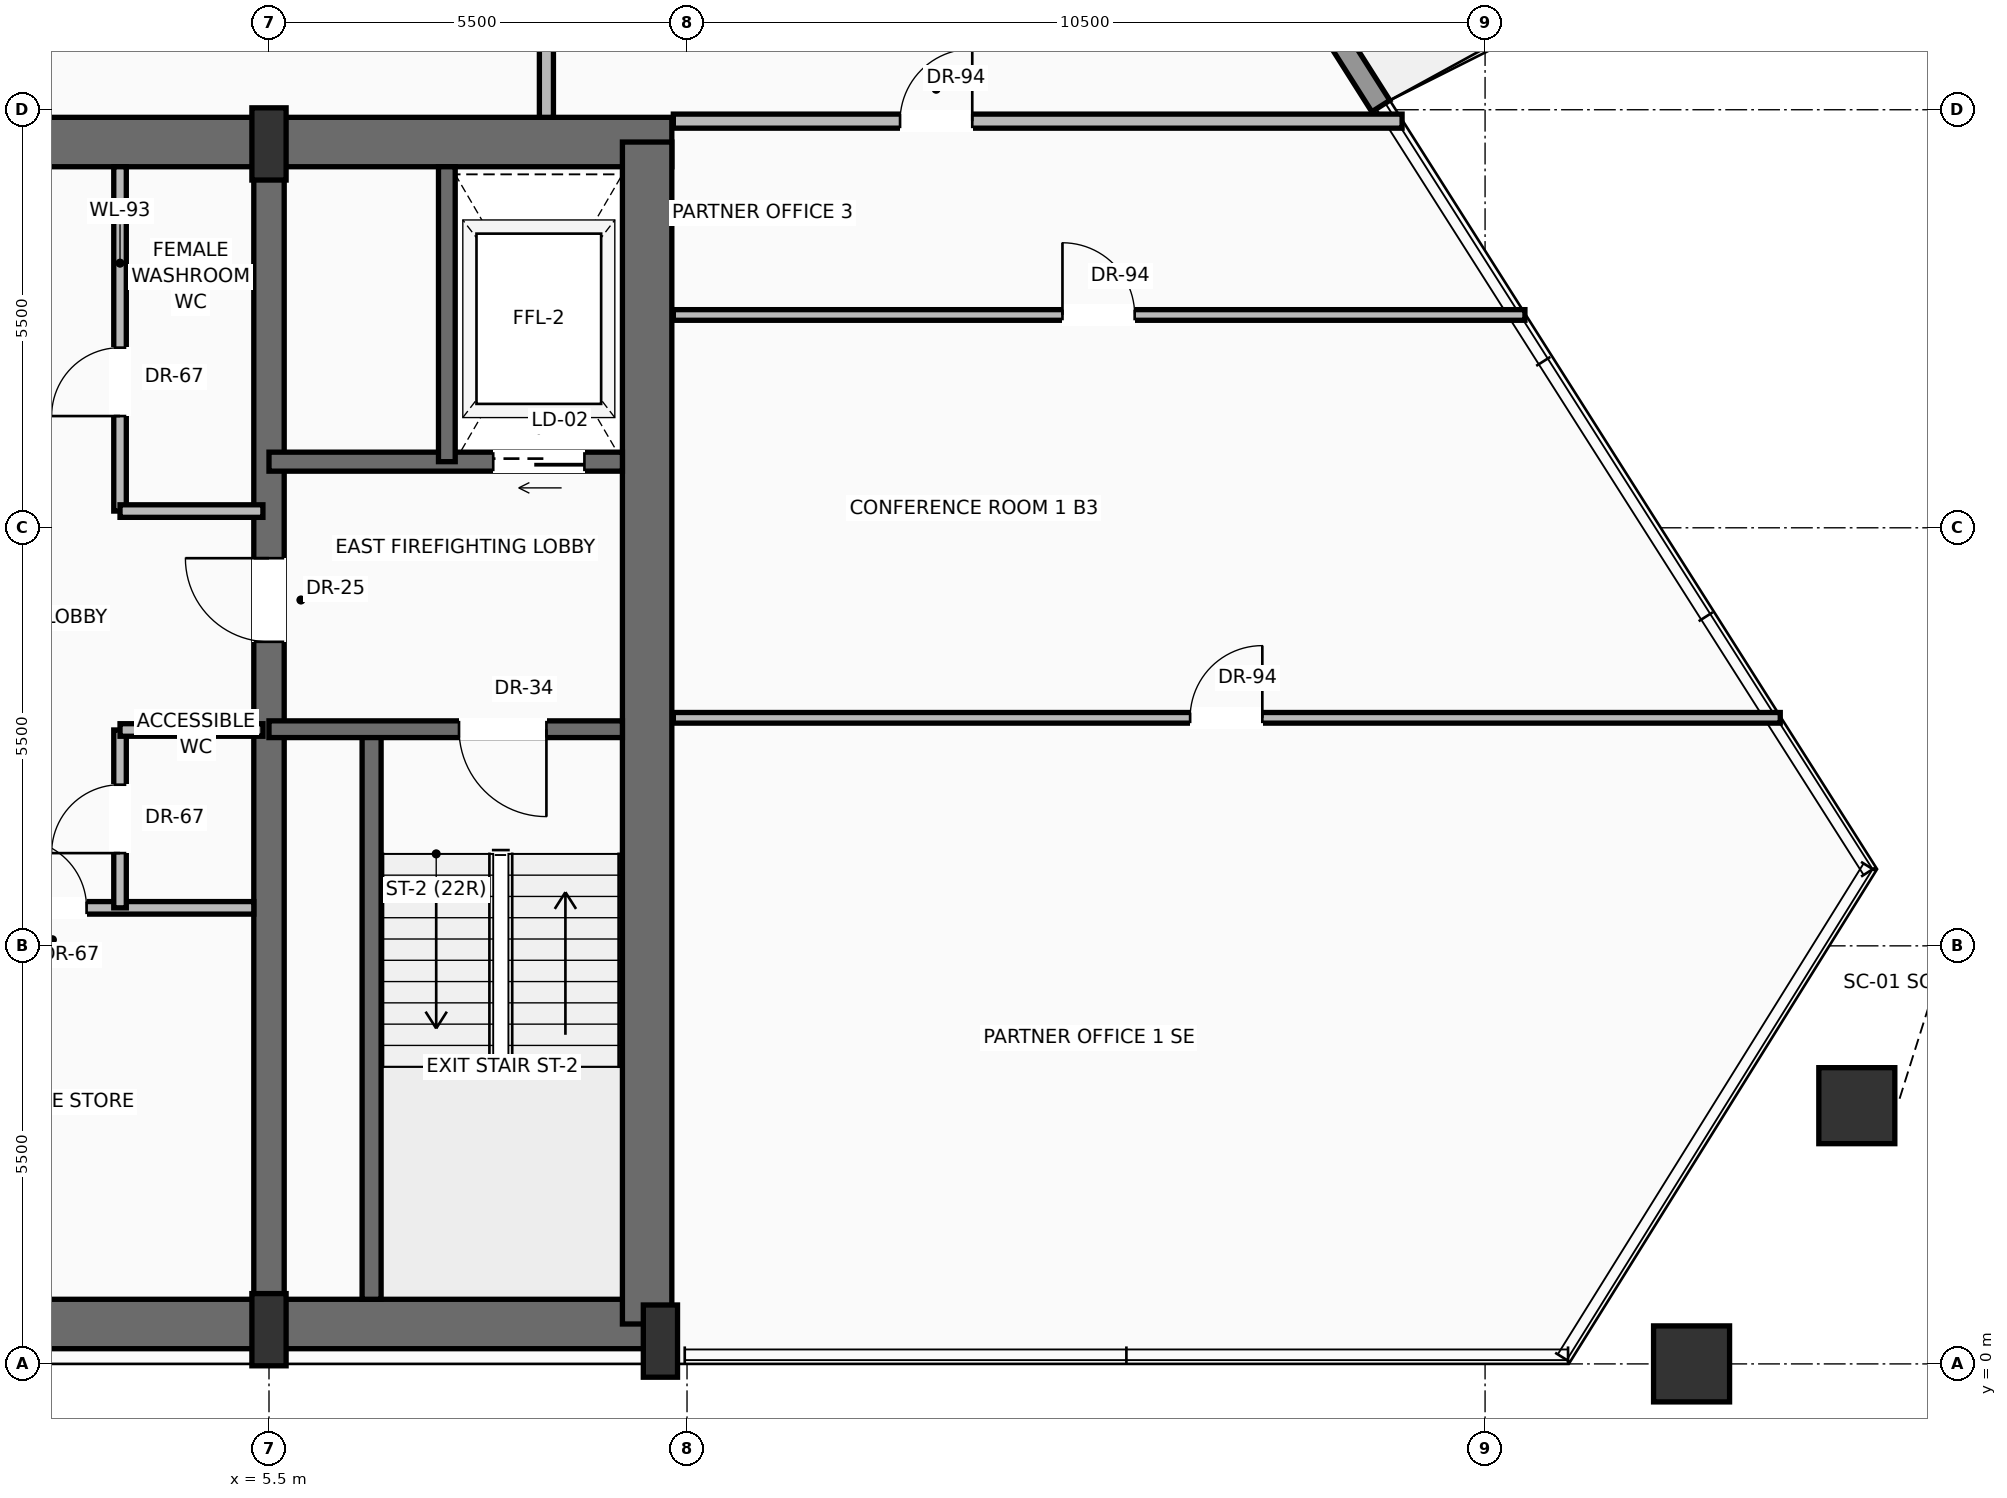
"""IFC4 building model, lengths in metres.
Left out: names, types, materials, properties, quantities, classifications, styles, units other than length and angle.
Written with IfcOpenShell. Run it as: python <this file> out.ifc"""

import sys

from ifc_helpers import new_model, si_unit, direction, frame, frame_2d, origin, origin_2d, place, context, subcontext, project, spatial, rectangle, hollow_rectangle, extrude, source, transform, mapped, element, fill, save


model = new_model("IFC4")
c1 = context("Model", 3, precision=1e-05, world=origin(), true_north=direction((0.0, 1.0)))
c2 = subcontext(c1, "Body", "Model", "MODEL_VIEW")
j1 = project(units=[si_unit("LENGTHUNIT", "METRE"), si_unit("PLANEANGLEUNIT", "RADIAN")], contexts=[c1])
p1 = place(None, origin())
s1 = spatial("IfcSite", under=j1, at=p1, CompositionType="ELEMENT")
p2 = place(p1, origin())
s2 = spatial("IfcBuilding", under=s1, at=p2, CompositionType="ELEMENT")
p3 = place(p2, frame((0.0, 0.0, 182.1)))
s3 = spatial("IfcBuildingStorey", under=s2, at=p3, CompositionType="ELEMENT", Elevation=182.1)
p4 = place(p3, frame((-10.65, 0.525, 0.0), z_axis=(0.0, 0.0, 1.0), x_axis=(1.0, 0.0, 0.0)))
e1 = element("IfcWall", 1, at=p4, inside=s3, PredefinedType="SHEAR", context=c2, shape_type="SweptSolid", body=[
    extrude(rectangle(XDim=21.3, YDim=0.65, at=frame_2d((10.65, 0.0))), origin(), (0.0, 0.0, 1.0), 3.47),
])
p5 = place(p3, frame((-10.8, 16.075, 0.0), z_axis=(0.0, 0.0, 1.0), x_axis=(1.0, 0.0, 0.0)))
e2 = element("IfcWall", 2, at=p5, inside=s3, PredefinedType="SHEAR", context=c2, shape_type="SweptSolid", body=[
    extrude(rectangle(XDim=21.6, YDim=0.65, at=frame_2d((10.8, 0.0))), origin(), (0.0, 0.0, 1.0), 3.47),
])
p6 = place(p5, frame((3.37, 0.0, 0.0)))
e3 = element("IfcOpeningElement", 3, at=p6, cuts=e2, PredefinedType="OPENING", context=c2, shape_type="SweptSolid", body=[
    extrude(rectangle(XDim=1.3, YDim=2.3, at=frame_2d((0.65, 1.15))), frame((0.0, 0.335, 0.0), z_axis=(0.0, -1.0, 0.0), x_axis=(1.0, 0.0, 0.0)), (0.0, 0.0, 1.0), 0.67),
])
p7 = place(p5, frame((9.8, 0.0, 0.0)))
e4 = element("IfcOpeningElement", 4, at=p7, cuts=e2, PredefinedType="OPENING", context=c2, shape_type="SweptSolid", body=[
    extrude(rectangle(XDim=2.0, YDim=2.4, at=frame_2d((1.0, 1.2))), frame((0.0, 0.335, 0.0), z_axis=(0.0, -1.0, 0.0), x_axis=(1.0, 0.0, 0.0)), (0.0, 0.0, 1.0), 0.67),
])
p8 = place(p3, frame((10.475, 0.525, 0.0), z_axis=(0.0, 0.0, 1.0), x_axis=(0.0, 1.0, 0.0)))
e5 = element("IfcWall", 5, at=p8, inside=s3, PredefinedType="SHEAR", context=c2, shape_type="SweptSolid", body=[
    extrude(rectangle(XDim=15.55, YDim=0.65, at=frame_2d((7.775, 0.0))), origin(), (0.0, 0.0, 1.0), 3.47),
])
p9 = place(p3, frame((5.5, 0.525, 0.0), z_axis=(0.0, 0.0, 1.0), x_axis=(0.0, 1.0, 0.0)))
e6 = element("IfcWall", 6, at=p9, inside=s3, PredefinedType="SHEAR", context=c2, shape_type="SweptSolid", body=[
    extrude(rectangle(XDim=15.55, YDim=0.4, at=frame_2d((7.775, 0.0))), origin(), (0.0, 0.0, 1.0), 3.47),
])
p10 = place(p9, frame((8.975, 0.0, 0.0)))
e7 = element("IfcOpeningElement", 7, at=p10, cuts=e6, PredefinedType="OPENING", context=c2, shape_type="SweptSolid", body=[
    extrude(rectangle(XDim=1.1, YDim=2.2, at=frame_2d((0.55, 1.1))), frame((0.0, 0.21, 0.0), z_axis=(0.0, -1.0, 0.0), x_axis=(1.0, 0.0, 0.0)), (0.0, 0.0, 1.0), 0.42),
])
m1 = source(origin(), c2, "Body", "SweptSolid", [
    extrude(rectangle(XDim=0.45, YDim=0.95, at=origin_2d()), origin(), (0.0, 0.0, 1.0), 3.7),
])
for number, where, z_axis, x_axis in (
    (8, (5.5, 0.45, 0.0), (0.0, 0.0, 1.0), (1.0, 0.0, 0.0)),
    (9, (10.65, 0.3, 0.0), (0.0, 0.0, 1.0), (1.0, 0.0, 0.0)),
    (10, (5.5, 16.05, 0.0), (0.0, 0.0, 1.0), (1.0, 0.0, 0.0)),
):
    element("IfcColumn", number, at=place(p3, frame(where, z_axis=z_axis, x_axis=x_axis)), inside=s3, PredefinedType="PILASTER", context=c2, shape_type="MappedRepresentation", body=[
        mapped(m1, transform((0.0, 0.0, 0.0), scale=1.0)),
    ])
m2 = source(origin(), c2, "Body", "SweptSolid", [
    extrude(hollow_rectangle(XDim=1.0, YDim=1.0, WallThickness=0.05, at=origin_2d()), origin(), (0.0, 0.0, 1.0), 3.691),
])
p11 = place(p3, frame((24.217, 0.0, 0.004), z_axis=(0.005688114871, 0.0, 0.999983822544), x_axis=(0.0, 1.0, 0.0)))
e11 = element("IfcColumn", 11, at=p11, inside=s3, PredefinedType="COLUMN", context=c2, shape_type="MappedRepresentation", body=[
    mapped(m2, transform((0.0, 0.0, 0.0), scale=1.0)),
])
m3 = source(origin(), c2, "Body", "SweptSolid", [
    extrude(hollow_rectangle(XDim=1.0, YDim=1.0, WallThickness=0.05, at=origin_2d()), origin(), (0.0, 0.0, 1.0), 3.692),
])
p12 = place(p3, frame((26.391, 3.397, 0.004), z_axis=(-0.005885896264, -0.014681673826, 0.999874894514), x_axis=(0.928188064334, -0.372111431197, 0.0)))
e12 = element("IfcColumn", 12, at=p12, inside=s3, PredefinedType="COLUMN", context=c2, shape_type="MappedRepresentation", body=[
    mapped(m3, transform((0.0, 0.0, 0.0), scale=1.0)),
])
p13 = place(p3, frame((10.054, 32.443, 0.0), z_axis=(0.0, 0.0, 1.0), x_axis=(0.535358537379, -0.844624908735, 0.0)))
e13 = element("IfcWall", 13, at=p13, inside=s3, PredefinedType="SOLIDWALL", context=c2, shape_type="SweptSolid", body=[
    extrude(rectangle(XDim=18.818, YDim=0.28, at=frame_2d((9.409, 0.0))), origin(), (0.0, 0.0, 1.0), 3.05),
])
p14 = place(p13, frame((4.516, 0.0, 0.0)))
e14 = element("IfcOpeningElement", 14, at=p14, cuts=e13, PredefinedType="OPENING", context=c2, shape_type="SweptSolid", body=[
    extrude(rectangle(XDim=1.6, YDim=2.35, at=frame_2d((0.8, 1.175))), frame((0.0, 0.15, 0.0), z_axis=(0.0, -1.0, 0.0), x_axis=(1.0, 0.0, 0.0)), (0.0, 0.0, 1.0), 0.3),
])
p15 = place(p13, frame((12.796, 0.0, 0.9)))
e15 = element("IfcOpeningElement", 15, at=p15, cuts=e13, PredefinedType="OPENING", context=c2, shape_type="SweptSolid", body=[
    extrude(rectangle(XDim=2.0, YDim=1.85, at=frame_2d((1.0, 0.925))), frame((0.0, 0.15, 0.0), z_axis=(0.0, -1.0, 0.0), x_axis=(1.0, 0.0, 0.0)), (0.0, 0.0, 1.0), 0.3),
])
p16 = place(p3, frame((6.85, 0.85, 0.0), z_axis=(0.0, 0.0, 1.0), x_axis=(0.0, 1.0, 0.0)))
e16 = element("IfcWall", 16, at=p16, inside=s3, PredefinedType="SOLIDWALL", context=c2, shape_type="SweptSolid", body=[
    extrude(rectangle(XDim=7.5, YDim=0.25, at=frame_2d((3.75, 0.0))), origin(), (0.0, 0.0, 1.0), 3.47),
])
p17 = place(p3, frame((10.15, 8.35, 0.0), z_axis=(0.0, 0.0, 1.0), x_axis=(-1.0, 0.0, 0.0)))
e17 = element("IfcWall", 17, at=p17, inside=s3, PredefinedType="SOLIDWALL", context=c2, shape_type="SweptSolid", body=[
    extrude(rectangle(XDim=4.65, YDim=0.22, at=frame_2d((2.325, 0.0))), origin(), (0.0, 0.0, 1.0), 3.47),
])
p18 = place(p17, frame((1.0, 0.0, 0.0)))
e18 = element("IfcOpeningElement", 18, at=p18, cuts=e17, PredefinedType="OPENING", context=c2, shape_type="SweptSolid", body=[
    extrude(rectangle(XDim=1.15, YDim=2.2, at=frame_2d((0.575, 1.1))), frame((0.0, 0.12, 0.0), z_axis=(0.0, -1.0, 0.0), x_axis=(1.0, 0.0, 0.0)), (0.0, 0.0, 1.0), 0.24),
])
p19 = place(p3, frame((10.15, 11.87, 0.0), z_axis=(0.0, 0.0, 1.0), x_axis=(-1.0, 0.0, 0.0)))
e19 = element("IfcWall", 19, at=p19, inside=s3, PredefinedType="SOLIDWALL", context=c2, shape_type="SweptSolid", body=[
    extrude(rectangle(XDim=4.65, YDim=0.25, at=frame_2d((2.325, 0.0))), origin(), (0.0, 0.0, 1.0), 3.47),
])
p20 = place(p19, frame((0.5, 0.0, 0.0)))
e20 = element("IfcOpeningElement", 20, at=p20, cuts=e19, PredefinedType="OPENING", context=c2, shape_type="SweptSolid", body=[
    extrude(rectangle(XDim=1.2, YDim=2.25, at=frame_2d((0.6, 1.125))), frame((0.0, 0.135, 0.0), z_axis=(0.0, -1.0, 0.0), x_axis=(1.0, 0.0, 0.0)), (0.0, 0.0, 1.0), 0.27),
])
p21 = place(p3, frame((7.84, 11.87, 0.0), z_axis=(0.0, 0.0, 1.0), x_axis=(0.0, 1.0, 0.0)))
e21 = element("IfcWall", 21, at=p21, inside=s3, PredefinedType="SOLIDWALL", context=c2, shape_type="SweptSolid", body=[
    extrude(rectangle(XDim=3.88, YDim=0.22, at=frame_2d((1.94, 0.0))), origin(), (0.0, 0.0, 1.0), 3.47),
])
p22 = place(p3, frame((1.82, 6.0, 0.0), z_axis=(0.0, 0.0, 1.0), x_axis=(1.0, 0.0, 0.0)))
e22 = element("IfcWall", 22, at=p22, inside=s3, PredefinedType="PARTITIONING", context=c2, shape_type="SweptSolid", body=[
    extrude(rectangle(XDim=3.48, YDim=0.165, at=frame_2d((1.74, 0.0))), origin(), (0.0, 0.0, 1.0), 3.462),
])
p23 = place(p22, frame((0.38, 0.0, 0.0)))
e23 = element("IfcOpeningElement", 23, at=p23, cuts=e22, PredefinedType="OPENING", context=c2, shape_type="SweptSolid", body=[
    extrude(rectangle(XDim=0.9, YDim=2.1, at=frame_2d((0.45, 1.05))), frame((0.0, 0.093, 0.0), z_axis=(0.0, -1.0, 0.0), x_axis=(1.0, 0.0, 0.0)), (0.0, 0.0, 1.0), 0.185),
])
p24 = place(p3, frame((3.54, 6.0, 0.0), z_axis=(0.0, 0.0, 1.0), x_axis=(0.0, 1.0, 0.0)))
e24 = element("IfcWall", 24, at=p24, inside=s3, PredefinedType="PARTITIONING", context=c2, shape_type="SweptSolid", body=[
    extrude(rectangle(XDim=2.34, YDim=0.165, at=frame_2d((1.17, 0.0))), origin(), (0.0, 0.0, 1.0), 3.462),
])
p25 = place(p24, frame((0.72, 0.0, 0.0)))
e25 = element("IfcOpeningElement", 25, at=p25, cuts=e24, PredefinedType="OPENING", context=c2, shape_type="SweptSolid", body=[
    extrude(rectangle(XDim=0.9, YDim=2.1, at=frame_2d((0.45, 1.05))), frame((0.0, 0.093, 0.0), z_axis=(0.0, -1.0, 0.0), x_axis=(1.0, 0.0, 0.0)), (0.0, 0.0, 1.0), 0.185),
])
p26 = place(p3, frame((3.54, 8.34, 0.0), z_axis=(0.0, 0.0, 1.0), x_axis=(1.0, 0.0, 0.0)))
e26 = element("IfcWall", 26, at=p26, inside=s3, PredefinedType="PARTITIONING", context=c2, shape_type="SweptSolid", body=[
    extrude(rectangle(XDim=1.88, YDim=0.165, at=frame_2d((0.94, 0.0))), origin(), (0.0, 0.0, 1.0), 3.462),
])
p27 = place(p3, frame((3.54, 11.22, 0.0), z_axis=(0.0, 0.0, 1.0), x_axis=(0.0, 1.0, 0.0)))
e27 = element("IfcWall", 27, at=p27, inside=s3, PredefinedType="PARTITIONING", context=c2, shape_type="SweptSolid", body=[
    extrude(rectangle(XDim=4.53, YDim=0.165, at=frame_2d((2.265, 0.0))), origin(), (0.0, 0.0, 1.0), 3.462),
])
p28 = place(p27, frame((1.25, 0.0, 0.0)))
e28 = element("IfcOpeningElement", 28, at=p28, cuts=e27, PredefinedType="OPENING", context=c2, shape_type="SweptSolid", body=[
    extrude(rectangle(XDim=0.9, YDim=2.1, at=frame_2d((0.45, 1.05))), frame((0.0, 0.093, 0.0), z_axis=(0.0, -1.0, 0.0), x_axis=(1.0, 0.0, 0.0)), (0.0, 0.0, 1.0), 0.185),
])
p29 = place(p3, frame((3.54, 11.22, 0.0), z_axis=(0.0, 0.0, 1.0), x_axis=(1.0, 0.0, 0.0)))
e29 = element("IfcWall", 29, at=p29, inside=s3, PredefinedType="PARTITIONING", context=c2, shape_type="SweptSolid", body=[
    extrude(rectangle(XDim=1.88, YDim=0.165, at=frame_2d((0.94, 0.0))), origin(), (0.0, 0.0, 1.0), 3.462),
])
p30 = place(p3, frame((9.15, 16.4, 0.0), z_axis=(0.0, 0.0, 1.0), x_axis=(0.0, 1.0, 0.0)))
e30 = element("IfcWall", 30, at=p30, inside=s3, PredefinedType="PARTITIONING", context=c2, shape_type="SweptSolid", body=[
    extrude(rectangle(XDim=9.2, YDim=0.185, at=frame_2d((4.6, 0.0))), origin(), (0.0, 0.0, 1.0), 2.846),
])
p31 = place(p30, frame((4.551, 0.0, 0.0)))
e31 = element("IfcOpeningElement", 31, at=p31, cuts=e30, PredefinedType="OPENING", context=c2, shape_type="SweptSolid", body=[
    extrude(rectangle(XDim=0.95, YDim=2.2, at=frame_2d((0.475, 1.1))), frame((0.0, 0.103, 0.0), z_axis=(0.0, -1.0, 0.0), x_axis=(1.0, 0.0, 0.0)), (0.0, 0.0, 1.0), 0.205),
])
p32 = place(p30, frame((2.041, 0.0, 0.0)))
e32 = element("IfcOpeningElement", 32, at=p32, cuts=e30, PredefinedType="OPENING", context=c2, shape_type="SweptSolid", body=[
    extrude(rectangle(XDim=0.95, YDim=2.2, at=frame_2d((0.475, 1.1))), frame((0.0, 0.103, 0.0), z_axis=(0.0, -1.0, 0.0), x_axis=(1.0, 0.0, 0.0)), (0.0, 0.0, 1.0), 0.205),
])
p33 = place(p3, frame((10.82, 16.35, 0.0), z_axis=(0.0, 0.0, 1.0), x_axis=(1.0, 0.0, 0.0)))
e33 = element("IfcWall", 33, at=p33, inside=s3, PredefinedType="PARTITIONING", context=c2, shape_type="SweptSolid", body=[
    extrude(rectangle(XDim=9.588, YDim=0.185, at=frame_2d((4.794, 0.0))), origin(), (0.0, 0.0, 1.0), 3.462),
])
p34 = place(p33, frame((2.983, 0.0, 0.0)))
e34 = element("IfcOpeningElement", 34, at=p34, cuts=e33, PredefinedType="OPENING", context=c2, shape_type="SweptSolid", body=[
    extrude(rectangle(XDim=0.95, YDim=2.2, at=frame_2d((0.475, 1.1))), frame((0.0, 0.103, 0.0), z_axis=(0.0, -1.0, 0.0), x_axis=(1.0, 0.0, 0.0)), (0.0, 0.0, 1.0), 0.205),
])
p35 = place(p3, frame((10.82, 8.5, 0.0), z_axis=(0.0, 0.0, 1.0), x_axis=(1.0, 0.0, 0.0)))
e35 = element("IfcWall", 35, at=p35, inside=s3, PredefinedType="PARTITIONING", context=c2, shape_type="SweptSolid", body=[
    extrude(rectangle(XDim=14.564, YDim=0.14, at=frame_2d((7.282, 0.0))), origin(), (0.0, 0.0, 1.0), 3.462),
])
p36 = place(p35, frame((6.799, 0.0, 0.0)))
e36 = element("IfcOpeningElement", 36, at=p36, cuts=e35, PredefinedType="OPENING", context=c2, shape_type="SweptSolid", body=[
    extrude(rectangle(XDim=0.95, YDim=2.2, at=frame_2d((0.475, 1.1))), frame((0.0, 0.08, 0.0), z_axis=(0.0, -1.0, 0.0), x_axis=(1.0, 0.0, 0.0)), (0.0, 0.0, 1.0), 0.16),
])
p37 = place(p3, frame((10.82, 13.8, 0.0), z_axis=(0.0, 0.0, 1.0), x_axis=(1.0, 0.0, 0.0)))
e37 = element("IfcWall", 37, at=p37, inside=s3, PredefinedType="PARTITIONING", context=c2, shape_type="SweptSolid", body=[
    extrude(rectangle(XDim=11.204, YDim=0.14, at=frame_2d((5.602, 0.0))), origin(), (0.0, 0.0, 1.0), 3.462),
])
p38 = place(p37, frame((5.12, 0.0, 0.0)))
e38 = element("IfcOpeningElement", 38, at=p38, cuts=e37, PredefinedType="OPENING", context=c2, shape_type="SweptSolid", body=[
    extrude(rectangle(XDim=0.95, YDim=2.2, at=frame_2d((0.475, 1.1))), frame((0.0, 0.08, 0.0), z_axis=(0.0, -1.0, 0.0), x_axis=(1.0, 0.0, 0.0)), (0.0, 0.0, 1.0), 0.16),
])
m4 = source(origin(), c2, "Body", "SweptSolid", [
    extrude(rectangle(XDim=1.15, YDim=2.2, at=frame_2d((0.575, 1.1))), frame((0.0, 0.025, 0.0), z_axis=(0.0, -1.0, 0.0), x_axis=(1.0, 0.0, 0.0)), (0.0, 0.0, 1.0), 0.05),
])
p39 = place(p18, origin())
e39 = element("IfcDoor", 39, at=p39, inside=s3, OperationType="SINGLE_SWING_LEFT", PredefinedType="DOOR", context=c2, shape_type="MappedRepresentation", body=[
    mapped(m4, transform((0.0, 0.0, 0.0), scale=1.0)),
])
fill(e18, e39)
m5 = source(origin(), c2, "Body", "SweptSolid", [
    extrude(rectangle(XDim=1.1, YDim=2.2, at=frame_2d((0.55, 1.1))), frame((0.0, 0.025, 0.0), z_axis=(0.0, -1.0, 0.0), x_axis=(1.0, 0.0, 0.0)), (0.0, 0.0, 1.0), 0.05),
])
p40 = place(p10, origin())
e40 = element("IfcDoor", 40, at=p40, inside=s3, OperationType="SINGLE_SWING_RIGHT", PredefinedType="DOOR", context=c2, shape_type="MappedRepresentation", body=[
    mapped(m5, transform((0.0, 0.0, 0.0), scale=1.0)),
])
fill(e7, e40)
m6 = source(origin(), c2, "Body", "SweptSolid", [
    extrude(rectangle(XDim=1.2, YDim=2.25, at=frame_2d((0.6, 1.125))), frame((0.0, 0.025, 0.0), z_axis=(0.0, -1.0, 0.0), x_axis=(1.0, 0.0, 0.0)), (0.0, 0.0, 1.0), 0.05),
])
p41 = place(p20, origin())
e41 = element("IfcDoor", 41, at=p41, inside=s3, OperationType="SLIDING_TO_RIGHT", PredefinedType="DOOR", context=c2, shape_type="MappedRepresentation", body=[
    mapped(m6, transform((0.0, 0.0, 0.0), scale=1.0)),
])
fill(e20, e41)
m7 = source(origin(), c2, "Body", "SweptSolid", [
    extrude(rectangle(XDim=0.9, YDim=2.1, at=frame_2d((0.45, 1.05))), frame((0.0, 0.025, 0.0), z_axis=(0.0, -1.0, 0.0), x_axis=(1.0, 0.0, 0.0)), (0.0, 0.0, 1.0), 0.05),
])
p42 = place(p23, origin())
e42 = element("IfcDoor", 42, at=p42, inside=s3, OperationType="SINGLE_SWING_LEFT", PredefinedType="DOOR", context=c2, shape_type="MappedRepresentation", body=[
    mapped(m7, transform((0.0, 0.0, 0.0), scale=1.0)),
])
fill(e23, e42)
p43 = place(p25, origin())
e43 = element("IfcDoor", 43, at=p43, inside=s3, OperationType="SINGLE_SWING_LEFT", PredefinedType="DOOR", context=c2, shape_type="MappedRepresentation", body=[
    mapped(m7, transform((0.0, 0.0, 0.0), scale=1.0)),
])
fill(e25, e43)
p44 = place(p28, origin())
e44 = element("IfcDoor", 44, at=p44, inside=s3, OperationType="SINGLE_SWING_LEFT", PredefinedType="DOOR", context=c2, shape_type="MappedRepresentation", body=[
    mapped(m7, transform((0.0, 0.0, 0.0), scale=1.0)),
])
fill(e28, e44)
m8 = source(origin(), c2, "Body", "SweptSolid", [
    extrude(rectangle(XDim=0.95, YDim=2.2, at=frame_2d((0.475, 1.1))), frame((0.0, 0.025, 0.0), z_axis=(0.0, -1.0, 0.0), x_axis=(1.0, 0.0, 0.0)), (0.0, 0.0, 1.0), 0.05),
])
p45 = place(p34, origin())
e45 = element("IfcDoor", 45, at=p45, inside=s3, OperationType="SINGLE_SWING_RIGHT", PredefinedType="DOOR", context=c2, shape_type="MappedRepresentation", body=[
    mapped(m8, transform((0.0, 0.0, 0.0), scale=1.0)),
])
fill(e34, e45)
p46 = place(p38, origin())
e46 = element("IfcDoor", 46, at=p46, inside=s3, OperationType="SINGLE_SWING_LEFT", PredefinedType="DOOR", context=c2, shape_type="MappedRepresentation", body=[
    mapped(m8, transform((0.0, 0.0, 0.0), scale=1.0)),
])
fill(e38, e46)
p47 = place(p36, origin())
e47 = element("IfcDoor", 47, at=p47, inside=s3, OperationType="SINGLE_SWING_RIGHT", PredefinedType="DOOR", context=c2, shape_type="MappedRepresentation", body=[
    mapped(m8, transform((0.0, 0.0, 0.0), scale=1.0)),
])
fill(e36, e47)
save(model, sys.argv[1])
